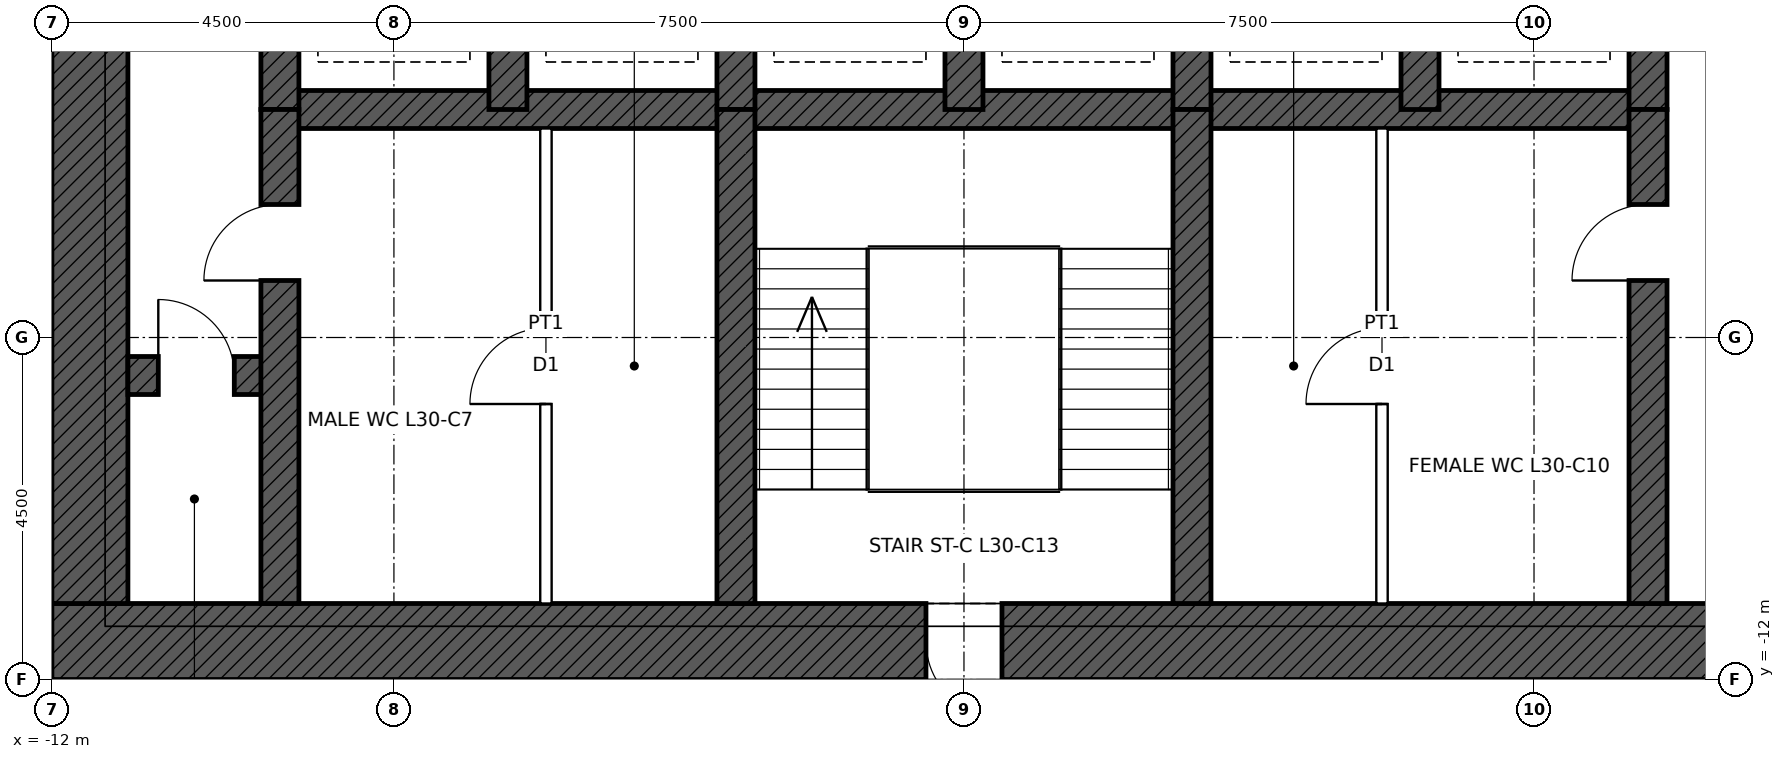
"""IFC4 building model, lengths in metres.
Left out: names, types, materials, properties, quantities, classifications, styles, units other than length and angle.
Written with IfcOpenShell. Run it as: python <this file> out.ifc"""

import sys

from ifc_helpers import new_model, si_unit, direction, frame, frame_2d, origin, place, context, subcontext, project, spatial, rectangle, extrude, element, fill, save


model = new_model("IFC4")
c1 = context("Model", 3, precision=1e-05, world=origin(), true_north=direction((0.0, 1.0)))
c2 = subcontext(c1, "Body", "Model", "MODEL_VIEW")
j1 = project(units=[si_unit("LENGTHUNIT", "METRE"), si_unit("PLANEANGLEUNIT", "RADIAN")], contexts=[c1])
p1 = place(None, origin())
s1 = spatial("IfcSite", under=j1, at=p1, CompositionType="ELEMENT")
p2 = place(p1, origin())
s2 = spatial("IfcBuilding", under=s1, at=p2, CompositionType="ELEMENT")
p3 = place(p2, frame((0.0, 0.0, 149.4)))
s3 = spatial("IfcBuildingStorey", under=s2, at=p3, CompositionType="ELEMENT", Elevation=149.4)
p4 = place(p3, frame((12.0, -11.5, 0.0), z_axis=(0.0, 0.0, 1.0), x_axis=(-1.0, 0.0, 0.0)))
e1 = element("IfcWall", 1, at=p4, inside=s3, PredefinedType="SHEAR", context=c2, shape_type="SweptSolid", body=[
    extrude(rectangle(XDim=24.0, YDim=1.0, at=frame_2d((12.0, 0.0))), origin(), (0.0, 0.0, 1.0), 4.5),
])
p5 = place(p4, frame((11.5, 0.0, 0.0)))
e2 = element("IfcOpeningElement", 2, at=p5, cuts=e1, PredefinedType="OPENING", context=c2, shape_type="SweptSolid", body=[
    extrude(rectangle(XDim=1.0, YDim=2.1, at=frame_2d((0.5, 1.05))), frame((0.0, 0.51, 0.0), z_axis=(0.0, -1.0, 0.0), x_axis=(1.0, 0.0, 0.0)), (0.0, 0.0, 1.0), 1.02),
])
p6 = place(p4, frame((1.0, 0.0, 0.0)))
e3 = element("IfcOpeningElement", 3, at=p6, cuts=e1, PredefinedType="OPENING", context=c2, shape_type="SweptSolid", body=[
    extrude(rectangle(XDim=1.0, YDim=2.4, at=frame_2d((0.5, 1.2))), frame((0.0, 0.51, 0.0), z_axis=(0.0, -1.0, 0.0), x_axis=(1.0, 0.0, 0.0)), (0.0, 0.0, 1.0), 1.02),
])
p7 = place(p3, frame((-11.5, -11.0, 0.0), z_axis=(0.0, 0.0, 1.0), x_axis=(0.0, 1.0, 0.0)))
e4 = element("IfcWall", 4, at=p7, inside=s3, PredefinedType="SHEAR", context=c2, shape_type="SweptSolid", body=[
    extrude(rectangle(XDim=22.0, YDim=1.0, at=frame_2d((11.0, 0.0))), origin(), (0.0, 0.0, 1.0), 4.5),
])
p8 = place(p7, frame((10.5, 0.0, 0.0)))
e5 = element("IfcOpeningElement", 5, at=p8, cuts=e4, PredefinedType="OPENING", context=c2, shape_type="SweptSolid", body=[
    extrude(rectangle(XDim=1.0, YDim=2.4, at=frame_2d((0.5, 1.2))), frame((0.0, 0.51, 0.0), z_axis=(0.0, -1.0, 0.0), x_axis=(1.0, 0.0, 0.0)), (0.0, 0.0, 1.0), 1.02),
])
p9 = place(p3, frame((-9.0, -4.5, 0.0), z_axis=(0.0, 0.0, 1.0), x_axis=(1.0, 0.0, 0.0)))
e6 = element("IfcWall", 6, at=p9, inside=s3, PredefinedType="SHEAR", context=c2, shape_type="SweptSolid", body=[
    extrude(rectangle(XDim=18.0, YDim=0.5, at=frame_2d((9.0, 0.0))), origin(), (0.0, 0.0, 1.0), 4.5),
])
p10 = place(p3, frame((-11.0, -8.0, 0.0), z_axis=(0.0, 0.0, 1.0), x_axis=(1.0, 0.0, 0.0)))
e7 = element("IfcWall", 7, at=p10, inside=s3, PredefinedType="SHEAR", context=c2, shape_type="SweptSolid", body=[
    extrude(rectangle(XDim=2.0, YDim=0.5, at=frame_2d((1.0, 0.0))), origin(), (0.0, 0.0, 1.0), 4.5),
])
p11 = place(p10, frame((0.4, 0.0, 0.0)))
e8 = element("IfcOpeningElement", 8, at=p11, cuts=e7, PredefinedType="OPENING", context=c2, shape_type="SweptSolid", body=[
    extrude(rectangle(XDim=1.0, YDim=2.1, at=frame_2d((0.5, 1.05))), frame((0.0, 0.26, 0.0), z_axis=(0.0, -1.0, 0.0), x_axis=(1.0, 0.0, 0.0)), (0.0, 0.0, 1.0), 0.52),
])
for number, where, z_axis, x_axis in (
    (9, (-9.0, -4.5, 0.0), (0.0, 0.0, 1.0), (0.0, 1.0, 0.0)),
    (10, (9.0, -4.5, 0.0), (0.0, 0.0, 1.0), (0.0, 1.0, 0.0)),
    (11, (-6.0, -4.5, 0.0), (0.0, 0.0, 1.0), (0.0, 1.0, 0.0)),
    (12, (-3.0, -4.5, 0.0), (0.0, 0.0, 1.0), (0.0, 1.0, 0.0)),
    (13, (0.0, -4.5, 0.0), (0.0, 0.0, 1.0), (0.0, 1.0, 0.0)),
    (14, (3.0, -4.5, 0.0), (0.0, 0.0, 1.0), (0.0, 1.0, 0.0)),
    (15, (6.0, -4.5, 0.0), (0.0, 0.0, 1.0), (0.0, 1.0, 0.0)),
):
    element("IfcWall", number, at=place(p3, frame(where, z_axis=z_axis, x_axis=x_axis)), inside=s3, PredefinedType="SHEAR", context=c2, shape_type="SweptSolid", body=[
        extrude(rectangle(XDim=3.0, YDim=0.5, at=frame_2d((1.5, 0.0))), origin(), (0.0, 0.0, 1.0), 4.5),
    ])
p12 = place(p3, frame((-9.0, -11.0, 0.0), z_axis=(0.0, 0.0, 1.0), x_axis=(0.0, 1.0, 0.0)))
e16 = element("IfcWall", 16, at=p12, inside=s3, PredefinedType="SHEAR", context=c2, shape_type="SweptSolid", body=[
    extrude(rectangle(XDim=6.5, YDim=0.5, at=frame_2d((3.25, 0.0))), origin(), (0.0, 0.0, 1.0), 4.5),
])
p13 = place(p12, frame((4.25, 0.0, 0.0)))
e17 = element("IfcOpeningElement", 17, at=p13, cuts=e16, PredefinedType="OPENING", context=c2, shape_type="SweptSolid", body=[
    extrude(rectangle(XDim=1.0, YDim=2.1, at=frame_2d((0.5, 1.05))), frame((0.0, 0.26, 0.0), z_axis=(0.0, -1.0, 0.0), x_axis=(1.0, 0.0, 0.0)), (0.0, 0.0, 1.0), 0.52),
])
p14 = place(p3, frame((9.0, -11.0, 0.0), z_axis=(0.0, 0.0, 1.0), x_axis=(0.0, 1.0, 0.0)))
e18 = element("IfcWall", 18, at=p14, inside=s3, PredefinedType="SHEAR", context=c2, shape_type="SweptSolid", body=[
    extrude(rectangle(XDim=6.5, YDim=0.5, at=frame_2d((3.25, 0.0))), origin(), (0.0, 0.0, 1.0), 4.5),
])
p15 = place(p14, frame((4.25, 0.0, 0.0)))
e19 = element("IfcOpeningElement", 19, at=p15, cuts=e18, PredefinedType="OPENING", context=c2, shape_type="SweptSolid", body=[
    extrude(rectangle(XDim=1.0, YDim=2.1, at=frame_2d((0.5, 1.05))), frame((0.0, 0.26, 0.0), z_axis=(0.0, -1.0, 0.0), x_axis=(1.0, 0.0, 0.0)), (0.0, 0.0, 1.0), 0.52),
])
for number, where, z_axis, x_axis in (
    (20, (-3.0, -11.0, 0.0), (0.0, 0.0, 1.0), (0.0, 1.0, 0.0)),
    (21, (3.0, -11.0, 0.0), (0.0, 0.0, 1.0), (0.0, 1.0, 0.0)),
):
    element("IfcWall", number, at=place(p3, frame(where, z_axis=z_axis, x_axis=x_axis)), inside=s3, PredefinedType="SHEAR", context=c2, shape_type="SweptSolid", body=[
        extrude(rectangle(XDim=6.5, YDim=0.5, at=frame_2d((3.25, 0.0))), origin(), (0.0, 0.0, 1.0), 4.5),
    ])
p16 = place(p3, frame((-5.5, -11.0, 0.0), z_axis=(0.0, 0.0, 1.0), x_axis=(0.0, 1.0, 0.0)))
e22 = element("IfcWall", 22, at=p16, inside=s3, PredefinedType="PARTITIONING", context=c2, shape_type="SweptSolid", body=[
    extrude(rectangle(XDim=6.25, YDim=0.15, at=frame_2d((3.125, 0.0))), origin(), (0.0, 0.0, 1.0), 4.25),
])
p17 = place(p16, frame((2.625, 0.0, 0.0)))
e23 = element("IfcOpeningElement", 23, at=p17, cuts=e22, PredefinedType="OPENING", context=c2, shape_type="SweptSolid", body=[
    extrude(rectangle(XDim=1.0, YDim=2.1, at=frame_2d((0.5, 1.05))), frame((0.0, 0.085, 0.0), z_axis=(0.0, -1.0, 0.0), x_axis=(1.0, 0.0, 0.0)), (0.0, 0.0, 1.0), 0.17),
])
p18 = place(p3, frame((5.5, -11.0, 0.0), z_axis=(0.0, 0.0, 1.0), x_axis=(0.0, 1.0, 0.0)))
e24 = element("IfcWall", 24, at=p18, inside=s3, PredefinedType="PARTITIONING", context=c2, shape_type="SweptSolid", body=[
    extrude(rectangle(XDim=6.25, YDim=0.15, at=frame_2d((3.125, 0.0))), origin(), (0.0, 0.0, 1.0), 4.25),
])
p19 = place(p18, frame((2.625, 0.0, 0.0)))
e25 = element("IfcOpeningElement", 25, at=p19, cuts=e24, PredefinedType="OPENING", context=c2, shape_type="SweptSolid", body=[
    extrude(rectangle(XDim=1.0, YDim=2.1, at=frame_2d((0.5, 1.05))), frame((0.0, 0.085, 0.0), z_axis=(0.0, -1.0, 0.0), x_axis=(1.0, 0.0, 0.0)), (0.0, 0.0, 1.0), 0.17),
])
p20 = place(p5, origin())
e26 = element("IfcDoor", 26, at=p20, inside=s3, OperationType="SINGLE_SWING_LEFT", PredefinedType="DOOR", context=c2, shape_type="SweptSolid", body=[
    extrude(rectangle(XDim=1.0, YDim=2.1, at=frame_2d((0.5, 1.05))), frame((0.0, 0.485, 0.0), z_axis=(0.0, -1.0, 0.0), x_axis=(1.0, 0.0, 0.0)), (0.0, 0.0, 1.0), 0.05),
])
fill(e2, e26)
p21 = place(p13, origin())
e27 = element("IfcDoor", 27, at=p21, inside=s3, OperationType="SINGLE_SWING_LEFT", PredefinedType="DOOR", context=c2, shape_type="SweptSolid", body=[
    extrude(rectangle(XDim=1.0, YDim=2.1, at=frame_2d((0.5, 1.05))), frame((0.0, 0.025, 0.0), z_axis=(0.0, -1.0, 0.0), x_axis=(1.0, 0.0, 0.0)), (0.0, 0.0, 1.0), 0.05),
])
fill(e17, e27)
p22 = place(p15, origin())
e28 = element("IfcDoor", 28, at=p22, inside=s3, OperationType="SINGLE_SWING_LEFT", PredefinedType="DOOR", context=c2, shape_type="SweptSolid", body=[
    extrude(rectangle(XDim=1.0, YDim=2.1, at=frame_2d((0.5, 1.05))), frame((0.0, 0.025, 0.0), z_axis=(0.0, -1.0, 0.0), x_axis=(1.0, 0.0, 0.0)), (0.0, 0.0, 1.0), 0.05),
])
fill(e19, e28)
p23 = place(p11, origin())
e29 = element("IfcDoor", 29, at=p23, inside=s3, OperationType="SINGLE_SWING_LEFT", PredefinedType="DOOR", context=c2, shape_type="SweptSolid", body=[
    extrude(rectangle(XDim=1.0, YDim=2.1, at=frame_2d((0.5, 1.05))), frame((0.0, 0.025, 0.0), z_axis=(0.0, -1.0, 0.0), x_axis=(1.0, 0.0, 0.0)), (0.0, 0.0, 1.0), 0.05),
])
fill(e8, e29)
p24 = place(p17, origin())
e30 = element("IfcDoor", 30, at=p24, inside=s3, OperationType="SINGLE_SWING_LEFT", PredefinedType="DOOR", context=c2, shape_type="SweptSolid", body=[
    extrude(rectangle(XDim=1.0, YDim=2.1, at=frame_2d((0.5, 1.05))), frame((0.0, 0.025, 0.0), z_axis=(0.0, -1.0, 0.0), x_axis=(1.0, 0.0, 0.0)), (0.0, 0.0, 1.0), 0.05),
])
fill(e23, e30)
p25 = place(p19, origin())
e31 = element("IfcDoor", 31, at=p25, inside=s3, OperationType="SINGLE_SWING_LEFT", PredefinedType="DOOR", context=c2, shape_type="SweptSolid", body=[
    extrude(rectangle(XDim=1.0, YDim=2.1, at=frame_2d((0.5, 1.05))), frame((0.0, 0.025, 0.0), z_axis=(0.0, -1.0, 0.0), x_axis=(1.0, 0.0, 0.0)), (0.0, 0.0, 1.0), 0.05),
])
fill(e25, e31)
save(model, sys.argv[1])
